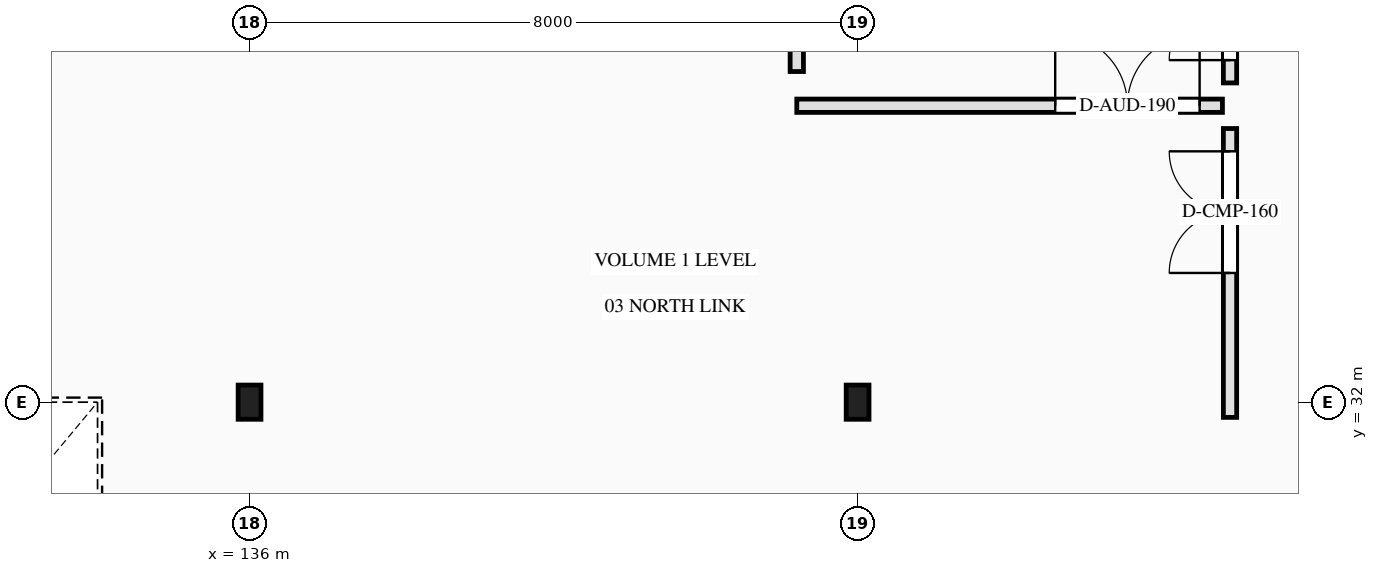
"""IFC4 building model, lengths in metres.
Left out: names, types, materials, properties, quantities, classifications, styles, units other than length and angle.
Written with IfcOpenShell. Run it as: python <this file> out.ifc"""

import sys

from ifc_helpers import new_model, si_unit, direction, frame, frame_2d, origin, origin_2d, place, context, subcontext, project, spatial, rectangle, i_section, extrude, element, fill, save


model = new_model("IFC4")
c1 = context("Model", 3, precision=1e-05, world=origin(), true_north=direction((0.0, 1.0)))
c2 = subcontext(c1, "Body", "Model", "MODEL_VIEW")
j1 = project(units=[si_unit("LENGTHUNIT", "METRE"), si_unit("PLANEANGLEUNIT", "RADIAN")], contexts=[c1])
p1 = place(None, origin())
s1 = spatial("IfcSite", under=j1, at=p1, CompositionType="ELEMENT")
p2 = place(p1, origin())
s2 = spatial("IfcBuilding", under=s1, at=p2, CompositionType="ELEMENT")
p3 = place(p2, frame((0.0, 0.0, 17.6)))
s3 = spatial("IfcBuildingStorey", under=s2, at=p3, CompositionType="ELEMENT", Elevation=17.6)
for number, where, z_axis, x_axis in (
    (1, (136.0, 32.0, 0.0), (0.0, 0.0, 1.0), (1.0, 0.0, 0.0)),
    (2, (144.0, 32.0, 0.0), (0.0, 0.0, 1.0), (1.0, 0.0, 0.0)),
):
    element("IfcColumn", number, at=place(p3, frame(where, z_axis=z_axis, x_axis=x_axis)), inside=s3, PredefinedType="COLUMN", context=c2, shape_type="SweptSolid", body=[
        extrude(i_section(OverallWidth=0.3, OverallDepth=0.45, WebThickness=0.014, FlangeThickness=0.026, FilletRadius=0.027, at=origin_2d()), origin(), (0.0, 0.0, 1.0), 4.2),
    ])
p4 = place(p3, frame((143.2, 35.9, 0.0), z_axis=(0.0, 0.0, 1.0), x_axis=(1.0, 0.0, 0.0)))
e3 = element("IfcWall", 3, at=p4, inside=s3, PredefinedType="PARTITIONING", context=c2, shape_type="SweptSolid", body=[
    extrude(rectangle(XDim=5.6, YDim=0.175, at=frame_2d((2.8, 0.0))), origin(), (0.0, 0.0, 1.0), 3.96),
])
p5 = place(p4, frame((3.4, 0.0, 0.0)))
e4 = element("IfcOpeningElement", 4, at=p5, cuts=e3, PredefinedType="OPENING", context=c2, shape_type="SweptSolid", body=[
    extrude(rectangle(XDim=1.9, YDim=2.35, at=frame_2d((0.95, 1.175))), frame((0.0, 0.097, 0.0), z_axis=(0.0, -1.0, 0.0), x_axis=(1.0, 0.0, 0.0)), (0.0, 0.0, 1.0), 0.195),
])
p6 = place(p3, frame((148.9, 36.2, 0.0), z_axis=(0.0, 0.0, 1.0), x_axis=(0.0, 1.0, 0.0)))
e5 = element("IfcWall", 5, at=p6, inside=s3, PredefinedType="PARTITIONING", context=c2, shape_type="SweptSolid", body=[
    extrude(rectangle(XDim=4.6, YDim=0.175, at=frame_2d((2.3, 0.0))), origin(), (0.0, 0.0, 1.0), 3.96),
])
p7 = place(p6, frame((0.3, 0.0, 0.0)))
e6 = element("IfcOpeningElement", 6, at=p7, cuts=e5, PredefinedType="OPENING", context=c2, shape_type="SweptSolid", body=[
    extrude(rectangle(XDim=1.6, YDim=2.25, at=frame_2d((0.8, 1.125))), frame((0.0, 0.097, 0.0), z_axis=(0.0, -1.0, 0.0), x_axis=(1.0, 0.0, 0.0)), (0.0, 0.0, 1.0), 0.195),
])
p8 = place(p3, frame((148.9, 31.8, 0.0), z_axis=(0.0, 0.0, 1.0), x_axis=(0.0, 1.0, 0.0)))
e7 = element("IfcWall", 7, at=p8, inside=s3, PredefinedType="PARTITIONING", context=c2, shape_type="SweptSolid", body=[
    extrude(rectangle(XDim=3.8, YDim=0.175, at=frame_2d((1.9, 0.0))), origin(), (0.0, 0.0, 1.0), 3.96),
])
p9 = place(p8, frame((1.9, 0.0, 0.0)))
e8 = element("IfcOpeningElement", 8, at=p9, cuts=e7, PredefinedType="OPENING", context=c2, shape_type="SweptSolid", body=[
    extrude(rectangle(XDim=1.6, YDim=2.25, at=frame_2d((0.8, 1.125))), frame((0.0, 0.097, 0.0), z_axis=(0.0, -1.0, 0.0), x_axis=(1.0, 0.0, 0.0)), (0.0, 0.0, 1.0), 0.195),
])
p10 = place(p3, frame((143.2, 36.35, 0.0), z_axis=(0.0, 0.0, 1.0), x_axis=(0.0, 1.0, 0.0)))
e9 = element("IfcWall", 9, at=p10, inside=s3, PredefinedType="PARTITIONING", context=c2, shape_type="SweptSolid", body=[
    extrude(rectangle(XDim=4.3, YDim=0.175, at=frame_2d((2.15, 0.0))), origin(), (0.0, 0.0, 1.0), 3.96),
])
p11 = place(p5, origin())
e10 = element("IfcDoor", 10, at=p11, inside=s3, OperationType="DOUBLE_DOOR_SINGLE_SWING", PredefinedType="DOOR", context=c2, shape_type="SweptSolid", body=[
    extrude(rectangle(XDim=1.9, YDim=2.35, at=frame_2d((0.95, 1.175))), frame((0.0, 0.025, 0.0), z_axis=(0.0, -1.0, 0.0), x_axis=(1.0, 0.0, 0.0)), (0.0, 0.0, 1.0), 0.05),
])
fill(e4, e10)
p12 = place(p7, origin())
e11 = element("IfcDoor", 11, at=p12, inside=s3, OperationType="DOUBLE_DOOR_SINGLE_SWING", PredefinedType="DOOR", context=c2, shape_type="SweptSolid", body=[
    extrude(rectangle(XDim=1.6, YDim=2.25, at=frame_2d((0.8, 1.125))), frame((0.0, 0.025, 0.0), z_axis=(0.0, -1.0, 0.0), x_axis=(1.0, 0.0, 0.0)), (0.0, 0.0, 1.0), 0.05),
])
fill(e6, e11)
p13 = place(p9, origin())
e12 = element("IfcDoor", 12, at=p13, inside=s3, OperationType="DOUBLE_DOOR_SINGLE_SWING", PredefinedType="DOOR", context=c2, shape_type="SweptSolid", body=[
    extrude(rectangle(XDim=1.6, YDim=2.25, at=frame_2d((0.8, 1.125))), frame((0.0, 0.025, 0.0), z_axis=(0.0, -1.0, 0.0), x_axis=(1.0, 0.0, 0.0)), (0.0, 0.0, 1.0), 0.05),
])
fill(e8, e12)
save(model, sys.argv[1])
